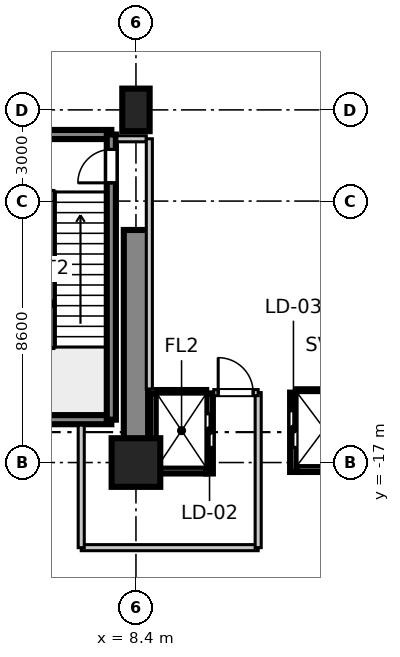
"""IFC4 building model, lengths in metres.
Left out: names, types, materials, properties, quantities, classifications, styles, units other than length and angle.
Written with IfcOpenShell. Run it as: python <this file> out.ifc"""

import sys

from ifc_helpers import new_model, si_unit, direction, frame, frame_2d, origin, origin_2d, place, context, subcontext, project, spatial, rectangle, extrude, source, transform, mapped, element, fill, save


model = new_model("IFC4")
c1 = context("Model", 3, precision=1e-05, world=origin(), true_north=direction((0.0, 1.0)))
c2 = subcontext(c1, "Body", "Model", "MODEL_VIEW")
j1 = project(units=[si_unit("LENGTHUNIT", "METRE"), si_unit("PLANEANGLEUNIT", "RADIAN")], contexts=[c1])
p1 = place(None, origin())
s1 = spatial("IfcSite", under=j1, at=p1, CompositionType="ELEMENT")
p2 = place(p1, origin())
s2 = spatial("IfcBuilding", under=s1, at=p2, CompositionType="ELEMENT")
p3 = place(p2, frame((0.0, 0.0, -10.8)))
s3 = spatial("IfcBuildingStorey", under=s2, at=p3, CompositionType="ELEMENT", Elevation=-10.8)
m1 = source(origin(), c2, "Body", "SweptSolid", [
    extrude(rectangle(XDim=1.6, YDim=1.6, at=origin_2d()), origin(), (0.0, 0.0, 1.0), 5.355),
])
p4 = place(p3, frame((8.4, -17.0, 0.0), z_axis=(0.0, 0.0, 1.0), x_axis=(1.0, 0.0, 0.0)))
e1 = element("IfcColumn", 1, at=p4, inside=s3, PredefinedType="COLUMN", context=c2, shape_type="MappedRepresentation", body=[
    mapped(m1, transform((0.0, 0.0, 0.0), scale=1.0)),
])
m2 = source(origin(), c2, "Body", "SweptSolid", [
    extrude(rectangle(XDim=0.9, YDim=1.4, at=origin_2d()), origin(), (0.0, 0.0, 1.0), 5.355),
])
p5 = place(p3, frame((8.4, -5.4, 0.0), z_axis=(0.0, 0.0, 1.0), x_axis=(1.0, 0.0, 0.0)))
e2 = element("IfcColumn", 2, at=p5, inside=s3, PredefinedType="PILASTER", context=c2, shape_type="MappedRepresentation", body=[
    mapped(m2, transform((0.0, 0.0, 0.0), scale=1.0)),
])
m3 = source(origin(), c2, "Body", "SweptSolid", [
    extrude(rectangle(XDim=7.65, YDim=0.8, at=frame_2d((3.825, 0.0))), origin(), (0.0, 0.0, 1.0), 5.05),
])
p6 = place(p3, frame((8.4, -17.0, 0.0), z_axis=(0.0, 0.0, 1.0), x_axis=(0.0, 1.0, 0.0)))
e3 = element("IfcWall", 3, at=p6, inside=s3, PredefinedType="SHEAR", context=c2, shape_type="MappedRepresentation", body=[
    mapped(m3, transform((0.0, 0.0, 0.0), scale=1.0)),
])
m4 = source(origin(), c2, "Body", "SweptSolid", [
    extrude(rectangle(XDim=3.98, YDim=0.3, at=frame_2d((1.99, 0.0))), origin(), (0.0, 0.0, 1.0), 5.05),
])
for number, where, z_axis, x_axis in (
    (4, (3.61, -15.59, 0.0), (0.0, 0.0, 1.0), (1.0, 0.0, 0.0)),
    (5, (3.61, -6.21, 0.0), (0.0, 0.0, 1.0), (1.0, 0.0, 0.0)),
):
    element("IfcWall", number, at=place(p3, frame(where, z_axis=z_axis, x_axis=x_axis)), inside=s3, PredefinedType="SHEAR", context=c2, shape_type="MappedRepresentation", body=[
        mapped(m4, transform((0.0, 0.0, 0.0), scale=1.0)),
    ])
m5 = source(origin(), c2, "Body", "SweptSolid", [
    extrude(rectangle(XDim=9.38, YDim=0.3, at=frame_2d((4.69, 0.0))), origin(), (0.0, 0.0, 1.0), 5.05),
])
p7 = place(p3, frame((7.59, -15.59, 0.0), z_axis=(0.0, 0.0, 1.0), x_axis=(0.0, 1.0, 0.0)))
e6 = element("IfcWall", 6, at=p7, inside=s3, PredefinedType="SHEAR", context=c2, shape_type="MappedRepresentation", body=[
    mapped(m5, transform((0.0, 0.0, 0.0), scale=1.0)),
])
p8 = place(p7, frame((7.79, 0.0, 0.0)))
e7 = element("IfcOpeningElement", 7, at=p8, cuts=e6, PredefinedType="OPENING", context=c2, shape_type="SweptSolid", body=[
    extrude(rectangle(XDim=1.1, YDim=2.15, at=frame_2d((0.55, 1.075))), frame((0.0, 0.16, 0.0), z_axis=(0.0, -1.0, 0.0), x_axis=(1.0, 0.0, 0.0)), (0.0, 0.0, 1.0), 0.32),
])
m6 = source(origin(), c2, "Body", "SweptSolid", [
    extrude(rectangle(XDim=2.635, YDim=0.22, at=frame_2d((1.317, 0.0))), origin(), (0.0, 0.0, 1.0), 5.05),
])
p9 = place(p3, frame((8.98, -17.36, 0.0), z_axis=(0.0, 0.0, 1.0), x_axis=(0.0, 1.0, 0.0)))
e8 = element("IfcWall", 8, at=p9, inside=s3, PredefinedType="SHEAR", context=c2, shape_type="MappedRepresentation", body=[
    mapped(m6, transform((0.0, 0.0, 0.0), scale=1.0)),
])
p10 = place(p3, frame((10.82, -17.36, 0.0), z_axis=(0.0, 0.0, 1.0), x_axis=(0.0, 1.0, 0.0)))
e9 = element("IfcWall", 9, at=p10, inside=s3, PredefinedType="SHEAR", context=c2, shape_type="MappedRepresentation", body=[
    mapped(m6, transform((0.0, 0.0, 0.0), scale=1.0)),
])
p11 = place(p10, frame((0.86, 0.0, 0.0)))
e10 = element("IfcOpeningElement", 10, at=p11, cuts=e9, PredefinedType="OPENING", context=c2, shape_type="SweptSolid", body=[
    extrude(rectangle(XDim=1.1, YDim=2.2, at=frame_2d((0.55, 1.1))), frame((0.0, 0.12, 0.0), z_axis=(0.0, -1.0, 0.0), x_axis=(1.0, 0.0, 0.0)), (0.0, 0.0, 1.0), 0.24),
])
m7 = source(origin(), c2, "Body", "SweptSolid", [
    extrude(rectangle(XDim=1.62, YDim=0.22, at=frame_2d((0.81, 0.0))), origin(), (0.0, 0.0, 1.0), 5.05),
])
p12 = place(p3, frame((9.09, -17.25, 0.0), z_axis=(0.0, 0.0, 1.0), x_axis=(1.0, 0.0, 0.0)))
e11 = element("IfcWall", 11, at=p12, inside=s3, PredefinedType="SHEAR", context=c2, shape_type="MappedRepresentation", body=[
    mapped(m7, transform((0.0, 0.0, 0.0), scale=1.0)),
])
m8 = source(origin(), c2, "Body", "SweptSolid", [
    extrude(rectangle(XDim=1.62, YDim=0.22, at=frame_2d((0.81, 0.0))), origin(), (0.0, 0.0, 1.0), 5.4),
])
p13 = place(p3, frame((9.09, -14.725, 0.0), z_axis=(0.0, 0.0, 1.0), x_axis=(1.0, 0.0, 0.0)))
e12 = element("IfcWall", 12, at=p13, inside=s3, PredefinedType="SHEAR", context=c2, shape_type="MappedRepresentation", body=[
    mapped(m8, transform((0.0, 0.0, 0.0), scale=1.0)),
])
m9 = source(origin(), c2, "Body", "SweptSolid", [
    extrude(rectangle(XDim=2.61, YDim=0.22, at=frame_2d((1.305, 0.0))), origin(), (0.0, 0.0, 1.0), 5.05),
])
p14 = place(p3, frame((13.58, -17.31, 0.0), z_axis=(0.0, 0.0, 1.0), x_axis=(0.0, 1.0, 0.0)))
e13 = element("IfcWall", 13, at=p14, inside=s3, PredefinedType="SHEAR", context=c2, shape_type="MappedRepresentation", body=[
    mapped(m9, transform((0.0, 0.0, 0.0), scale=1.0)),
])
p15 = place(p14, frame((0.81, 0.0, 0.0)))
e14 = element("IfcOpeningElement", 14, at=p15, cuts=e13, PredefinedType="OPENING", context=c2, shape_type="SweptSolid", body=[
    extrude(rectangle(XDim=1.2, YDim=2.2, at=frame_2d((0.6, 1.1))), frame((0.0, 0.12, 0.0), z_axis=(0.0, -1.0, 0.0), x_axis=(1.0, 0.0, 0.0)), (0.0, 0.0, 1.0), 0.24),
])
m10 = source(origin(), c2, "Body", "SweptSolid", [
    extrude(rectangle(XDim=1.82, YDim=0.22, at=frame_2d((0.91, 0.0))), origin(), (0.0, 0.0, 1.0), 5.05),
])
p16 = place(p3, frame((13.69, -17.2, 0.0), z_axis=(0.0, 0.0, 1.0), x_axis=(1.0, 0.0, 0.0)))
e15 = element("IfcWall", 15, at=p16, inside=s3, PredefinedType="SHEAR", context=c2, shape_type="MappedRepresentation", body=[
    mapped(m10, transform((0.0, 0.0, 0.0), scale=1.0)),
])
m11 = source(origin(), c2, "Body", "SweptSolid", [
    extrude(rectangle(XDim=1.82, YDim=0.22, at=frame_2d((0.91, 0.0))), origin(), (0.0, 0.0, 1.0), 5.4),
])
p17 = place(p3, frame((13.69, -14.7, 0.0), z_axis=(0.0, 0.0, 1.0), x_axis=(1.0, 0.0, 0.0)))
e16 = element("IfcWall", 16, at=p17, inside=s3, PredefinedType="SHEAR", context=c2, shape_type="MappedRepresentation", body=[
    mapped(m11, transform((0.0, 0.0, 0.0), scale=1.0)),
])
m12 = source(origin(), c2, "Body", "SweptSolid", [
    extrude(rectangle(XDim=5.82, YDim=0.2, at=frame_2d((2.91, 0.0))), origin(), (0.0, 0.0, 1.0), 3.4),
])
p18 = place(p3, frame((6.6, -19.8, 0.0), z_axis=(0.0, 0.0, 1.0), x_axis=(1.0, 0.0, 0.0)))
e17 = element("IfcWall", 17, at=p18, inside=s3, PredefinedType="PARTITIONING", context=c2, shape_type="MappedRepresentation", body=[
    mapped(m12, transform((0.0, 0.0, 0.0), scale=1.0)),
])
m13 = source(origin(), c2, "Body", "SweptSolid", [
    extrude(rectangle(XDim=4.03, YDim=0.2, at=frame_2d((2.015, 0.0))), origin(), (0.0, 0.0, 1.0), 3.4),
])
p19 = place(p3, frame((6.6, -19.8, 0.0), z_axis=(0.0, 0.0, 1.0), x_axis=(0.0, 1.0, 0.0)))
e18 = element("IfcWall", 18, at=p19, inside=s3, PredefinedType="PARTITIONING", context=c2, shape_type="MappedRepresentation", body=[
    mapped(m13, transform((0.0, 0.0, 0.0), scale=1.0)),
])
m14 = source(origin(), c2, "Body", "SweptSolid", [
    extrude(rectangle(XDim=5.1, YDim=0.2, at=frame_2d((2.55, 0.0))), origin(), (0.0, 0.0, 1.0), 3.4),
])
p20 = place(p3, frame((12.42, -19.8, 0.0), z_axis=(0.0, 0.0, 1.0), x_axis=(0.0, 1.0, 0.0)))
e19 = element("IfcWall", 19, at=p20, inside=s3, PredefinedType="PARTITIONING", context=c2, shape_type="MappedRepresentation", body=[
    mapped(m14, transform((0.0, 0.0, 0.0), scale=1.0)),
])
m15 = source(origin(), c2, "Body", "SweptSolid", [
    extrude(rectangle(XDim=1.46, YDim=0.2, at=frame_2d((0.73, 0.0))), origin(), (0.0, 0.0, 1.0), 3.4),
])
p21 = place(p3, frame((10.96, -14.7, 0.0), z_axis=(0.0, 0.0, 1.0), x_axis=(1.0, 0.0, 0.0)))
e20 = element("IfcWall", 20, at=p21, inside=s3, PredefinedType="PARTITIONING", context=c2, shape_type="MappedRepresentation", body=[
    mapped(m15, transform((0.0, 0.0, 0.0), scale=1.0)),
])
p22 = place(p21, frame((0.145, 0.0, 0.0)))
e21 = element("IfcOpeningElement", 21, at=p22, cuts=e20, PredefinedType="OPENING", context=c2, shape_type="SweptSolid", body=[
    extrude(rectangle(XDim=1.15, YDim=2.15, at=frame_2d((0.575, 1.075))), frame((0.0, 0.11, 0.0), z_axis=(0.0, -1.0, 0.0), x_axis=(1.0, 0.0, 0.0)), (0.0, 0.0, 1.0), 0.22),
])
m16 = source(origin(), c2, "Body", "SweptSolid", [
    extrude(rectangle(XDim=0.97, YDim=0.2, at=frame_2d((0.485, 0.0))), origin(), (0.0, 0.0, 1.0), 3.4),
])
p23 = place(p3, frame((7.77, -6.35, 0.0), z_axis=(0.0, 0.0, 1.0), x_axis=(1.0, 0.0, 0.0)))
e22 = element("IfcWall", 22, at=p23, inside=s3, PredefinedType="PARTITIONING", context=c2, shape_type="MappedRepresentation", body=[
    mapped(m16, transform((0.0, 0.0, 0.0), scale=1.0)),
])
m17 = source(origin(), c2, "Body", "SweptSolid", [
    extrude(rectangle(XDim=8.23, YDim=0.2, at=frame_2d((4.115, 0.0))), origin(), (0.0, 0.0, 1.0), 3.4),
])
p24 = place(p3, frame((8.84, -14.58, 0.0), z_axis=(0.0, 0.0, 1.0), x_axis=(0.0, 1.0, 0.0)))
e23 = element("IfcWall", 23, at=p24, inside=s3, PredefinedType="PARTITIONING", context=c2, shape_type="MappedRepresentation", body=[
    mapped(m17, transform((0.0, 0.0, 0.0), scale=1.0)),
])
m18 = source(origin(), c2, "Body", "SweptSolid", [
    extrude(rectangle(XDim=1.1, YDim=2.15, at=frame_2d((0.55, 1.075))), frame((0.0, 0.025, 0.0), z_axis=(0.0, -1.0, 0.0), x_axis=(1.0, 0.0, 0.0)), (0.0, 0.0, 1.0), 0.05),
])
p25 = place(p8, origin())
e24 = element("IfcDoor", 24, at=p25, inside=s3, OperationType="SINGLE_SWING_LEFT", PredefinedType="DOOR", context=c2, shape_type="MappedRepresentation", body=[
    mapped(m18, transform((0.0, 0.0, 0.0), scale=1.0)),
])
fill(e7, e24)
m19 = source(origin(), c2, "Body", "SweptSolid", [
    extrude(rectangle(XDim=1.1, YDim=2.2, at=frame_2d((0.55, 1.1))), frame((0.0, 0.025, 0.0), z_axis=(0.0, -1.0, 0.0), x_axis=(1.0, 0.0, 0.0)), (0.0, 0.0, 1.0), 0.05),
])
p26 = place(p11, frame((1.1, 0.0, 0.0), z_axis=(0.0, 0.0, 1.0), x_axis=(-1.0, 0.0, 0.0)))
e25 = element("IfcDoor", 25, at=p26, inside=s3, OperationType="DOUBLE_DOOR_SLIDING", PredefinedType="DOOR", context=c2, shape_type="MappedRepresentation", body=[
    mapped(m19, transform((0.0, 0.0, 0.0), scale=1.0)),
])
fill(e10, e25)
m20 = source(origin(), c2, "Body", "SweptSolid", [
    extrude(rectangle(XDim=1.2, YDim=2.2, at=frame_2d((0.6, 1.1))), frame((0.0, 0.025, 0.0), z_axis=(0.0, -1.0, 0.0), x_axis=(1.0, 0.0, 0.0)), (0.0, 0.0, 1.0), 0.05),
])
p27 = place(p15, origin())
e26 = element("IfcDoor", 26, at=p27, inside=s3, OperationType="DOUBLE_DOOR_SLIDING", PredefinedType="DOOR", context=c2, shape_type="MappedRepresentation", body=[
    mapped(m20, transform((0.0, 0.0, 0.0), scale=1.0)),
])
fill(e14, e26)
m21 = source(origin(), c2, "Body", "SweptSolid", [
    extrude(rectangle(XDim=1.15, YDim=2.15, at=frame_2d((0.575, 1.075))), frame((0.0, 0.025, 0.0), z_axis=(0.0, -1.0, 0.0), x_axis=(1.0, 0.0, 0.0)), (0.0, 0.0, 1.0), 0.05),
])
p28 = place(p22, origin())
e27 = element("IfcDoor", 27, at=p28, inside=s3, OperationType="SINGLE_SWING_LEFT", PredefinedType="DOOR", context=c2, shape_type="MappedRepresentation", body=[
    mapped(m21, transform((0.0, 0.0, 0.0), scale=1.0)),
])
fill(e21, e27)
save(model, sys.argv[1])
